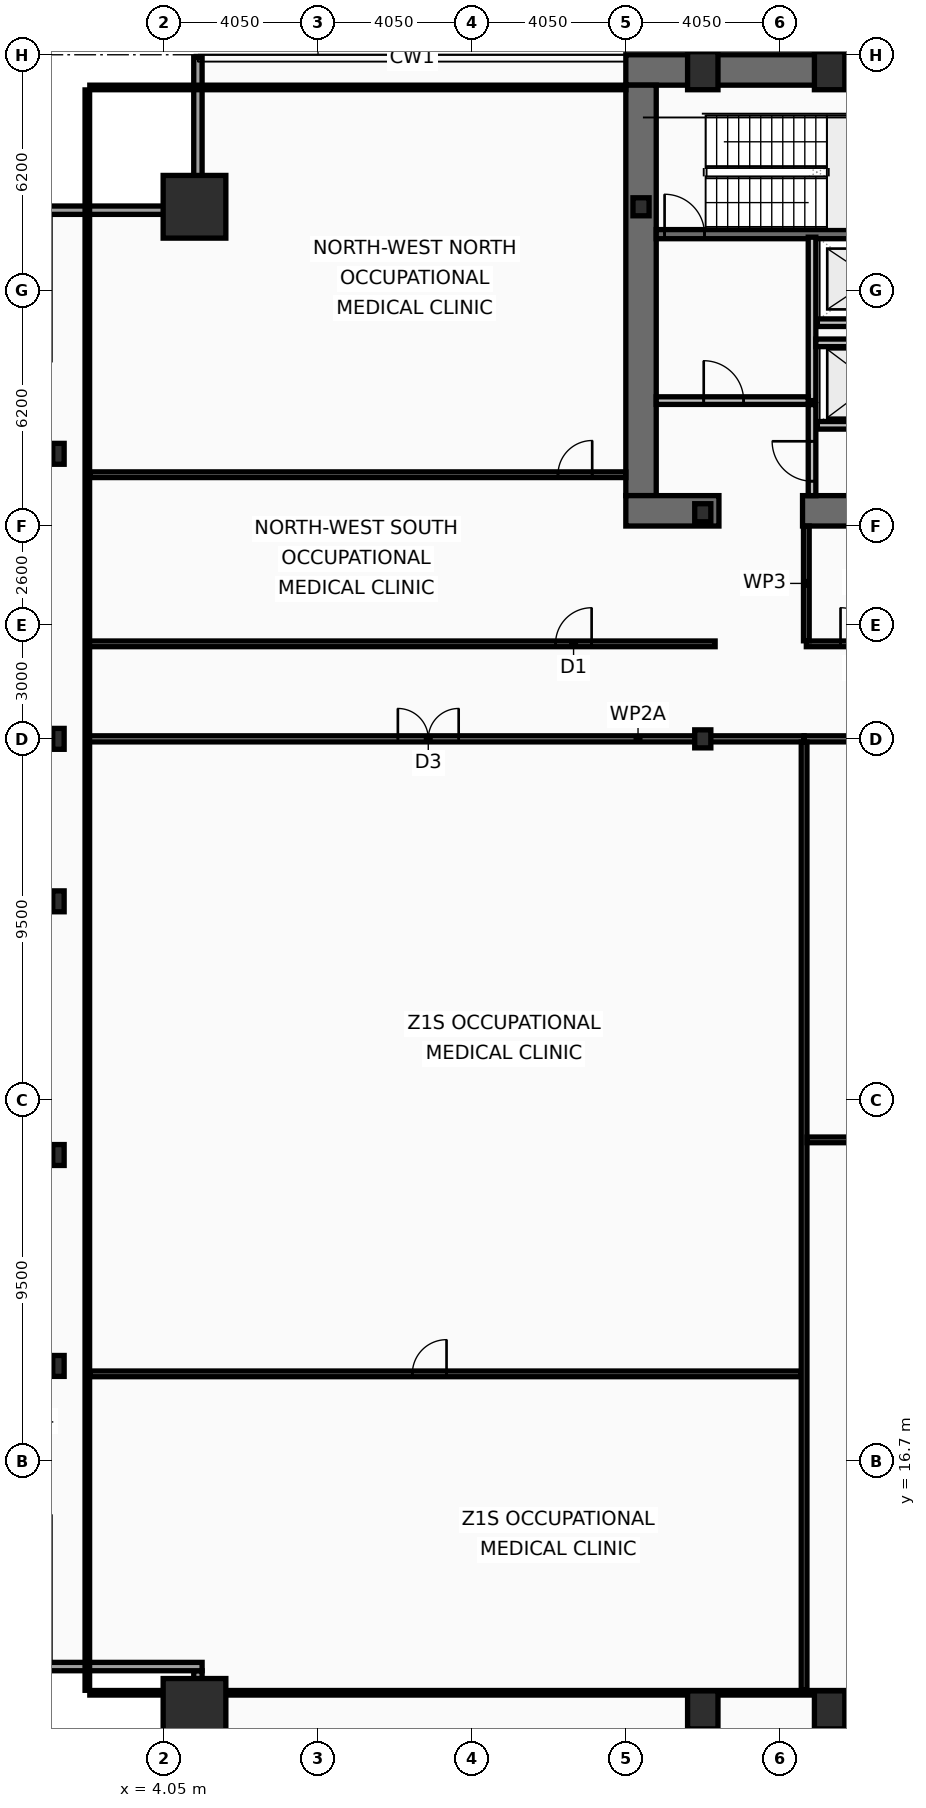
"""IFC4 building model, lengths in metres.
Left out: names, types, materials, properties, quantities, classifications, styles, units other than length and angle.
Written with IfcOpenShell. Run it as: python <this file> out.ifc"""

import sys

from ifc_helpers import new_model, si_unit, direction, frame, frame_2d, origin, origin_2d, place, context, subcontext, project, spatial, rectangle, hollow_rectangle, i_section, extrude, element, fill, save


model = new_model("IFC4")
c1 = context("Model", 3, precision=1e-05, world=origin(), true_north=direction((0.0, 1.0)))
c2 = subcontext(c1, "Body", "Model", "MODEL_VIEW")
j1 = project(units=[si_unit("LENGTHUNIT", "METRE"), si_unit("PLANEANGLEUNIT", "RADIAN")], contexts=[c1])
p1 = place(None, origin())
s1 = spatial("IfcSite", under=j1, at=p1, CompositionType="ELEMENT")
p2 = place(p1, origin())
s2 = spatial("IfcBuilding", under=s1, at=p2, CompositionType="ELEMENT")
p3 = place(p2, frame((0.0, 0.0, 37.8)))
s3 = spatial("IfcBuildingStorey", under=s2, at=p3, CompositionType="ELEMENT", Elevation=37.8)
p4 = place(p3, frame((16.2, 53.3, 0.0), z_axis=(0.0, 0.0, 1.0), x_axis=(1.0, 0.0, 0.0)))
e1 = element("IfcWall", 1, at=p4, inside=s3, PredefinedType="SHEAR", context=c2, shape_type="SweptSolid", body=[
    extrude(rectangle(XDim=40.5, YDim=0.8, at=frame_2d((20.25, 0.0))), origin(), (0.0, 0.0, 1.0), 3.82),
])
p5 = place(p3, frame((16.6, 42.1, 0.0), z_axis=(0.0, 0.0, 1.0), x_axis=(0.0, 1.0, 0.0)))
e2 = element("IfcWall", 2, at=p5, inside=s3, PredefinedType="SHEAR", context=c2, shape_type="SweptSolid", body=[
    extrude(rectangle(XDim=10.8, YDim=0.8, at=frame_2d((5.4, 0.0))), origin(), (0.0, 0.0, 1.0), 3.82),
])
p6 = place(p3, frame((18.65, 41.7, 0.0), z_axis=(0.0, 0.0, 1.0), x_axis=(-1.0, 0.0, 0.0)))
e3 = element("IfcWall", 3, at=p6, inside=s3, PredefinedType="SHEAR", context=c2, shape_type="SweptSolid", body=[
    extrude(rectangle(XDim=2.45, YDim=0.8, at=frame_2d((1.225, 0.0))), origin(), (0.0, 0.0, 1.0), 3.82),
])
p7 = place(p3, frame((32.3, 41.7, 0.0), z_axis=(0.0, 0.0, 1.0), x_axis=(-1.0, 0.0, 0.0)))
e4 = element("IfcWall", 4, at=p7, inside=s3, PredefinedType="SHEAR", context=c2, shape_type="SweptSolid", body=[
    extrude(rectangle(XDim=11.45, YDim=0.8, at=frame_2d((5.725, 0.0))), origin(), (0.0, 0.0, 1.0), 3.82),
])
p8 = place(p3, frame((17.0, 48.98, 0.0), z_axis=(0.0, 0.0, 1.0), x_axis=(1.0, 0.0, 0.0)))
e5 = element("IfcWall", 5, at=p8, inside=s3, PredefinedType="SHEAR", context=c2, shape_type="SweptSolid", body=[
    extrude(rectangle(XDim=7.22, YDim=0.24, at=frame_2d((3.61, 0.0))), origin(), (0.0, 0.0, 1.0), 3.82),
])
p9 = place(p8, frame((0.22, 0.0, 0.0)))
e6 = element("IfcOpeningElement", 6, at=p9, cuts=e5, PredefinedType="OPENING", context=c2, shape_type="SweptSolid", body=[
    extrude(rectangle(XDim=1.05, YDim=2.15, at=frame_2d((0.525, 1.075))), frame((0.0, 0.13, 0.0), z_axis=(0.0, -1.0, 0.0), x_axis=(1.0, 0.0, 0.0)), (0.0, 0.0, 1.0), 0.26),
])
for number, where, z_axis, x_axis in (
    (7, (4.85, 10.15, 0.0), (0.0, 0.0, 1.0), (1.0, 0.0, 0.0)),
    (8, (4.85, 49.7, 0.0), (0.0, 0.0, 1.0), (1.0, 0.0, 0.0)),
):
    element("IfcColumn", number, at=place(p3, frame(where, z_axis=z_axis, x_axis=x_axis)), inside=s3, PredefinedType="COLUMN", context=c2, shape_type="SweptSolid", body=[
        extrude(hollow_rectangle(XDim=1.65, YDim=1.65, WallThickness=0.075, at=origin_2d()), origin(), (0.0, 0.0, 1.0), 4.0),
    ])
for number, where, z_axis, x_axis in (
    (9, (18.225, 10.15, 0.0), (0.0, 0.0, 1.0), (1.0, 0.0, 0.0)),
    (10, (21.562, 10.15, 0.0), (0.0, 0.0, 1.0), (1.0, 0.0, 0.0)),
    (11, (18.225, 53.28, 0.0), (0.0, 0.0, 1.0), (1.0, 0.0, 0.0)),
    (12, (21.562, 53.28, 0.0), (0.0, 0.0, 1.0), (1.0, 0.0, 0.0)),
):
    element("IfcColumn", number, at=place(p3, frame(where, z_axis=z_axis, x_axis=x_axis)), inside=s3, PredefinedType="COLUMN", context=c2, shape_type="SweptSolid", body=[
        extrude(hollow_rectangle(XDim=0.8, YDim=1.0, WallThickness=0.055, at=origin_2d()), origin(), (0.0, 0.0, 1.0), 4.0),
    ])
for number, where, z_axis, x_axis in (
    (13, (1.27, 19.2, 0.0), (0.0, 0.0, 1.0), (1.0, 0.0, 0.0)),
    (14, (1.27, 24.75, 0.0), (0.0, 0.0, 1.0), (1.0, 0.0, 0.0)),
    (15, (1.27, 31.425, 0.0), (0.0, 0.0, 1.0), (1.0, 0.0, 0.0)),
    (16, (1.27, 35.7, 0.0), (0.0, 0.0, 1.0), (1.0, 0.0, 0.0)),
    (17, (1.27, 43.2, 0.0), (0.0, 0.0, 1.0), (1.0, 0.0, 0.0)),
):
    element("IfcColumn", number, at=place(p3, frame(where, z_axis=z_axis, x_axis=x_axis)), inside=s3, PredefinedType="COLUMN", context=c2, shape_type="SweptSolid", body=[
        extrude(i_section(OverallWidth=0.3, OverallDepth=0.55, WebThickness=0.015, FlangeThickness=0.029, at=origin_2d()), origin(), (0.0, 0.0, 1.0), 4.0),
    ])
for number, where, z_axis, x_axis in (
    (18, (16.6, 49.7, 0.0), (0.0, 0.0, 1.0), (1.0, 0.0, 0.0)),
    (19, (18.225, 35.7, 0.0), (0.0, 0.0, 1.0), (1.0, 0.0, 0.0)),
    (20, (18.225, 41.65, 0.0), (0.0, 0.0, 1.0), (1.0, 0.0, 0.0)),
):
    element("IfcColumn", number, at=place(p3, frame(where, z_axis=z_axis, x_axis=x_axis)), inside=s3, PredefinedType="COLUMN", context=c2, shape_type="SweptSolid", body=[
        extrude(i_section(OverallWidth=0.424, OverallDepth=0.474, WebThickness=0.048, FlangeThickness=0.077, at=origin_2d()), origin(), (0.0, 0.0, 1.0), 4.0),
    ])
p10 = place(p3, frame((4.94, 7.27, 0.0), z_axis=(0.0, 0.0, 1.0), x_axis=(0.0, 1.0, 0.0)))
e21 = element("IfcWall", 21, at=p10, inside=s3, PredefinedType="SOLIDWALL", context=c2, shape_type="SweptSolid", body=[
    extrude(rectangle(XDim=3.91, YDim=0.22, at=frame_2d((1.955, 0.0))), origin(), (0.0, 0.0, 1.0), 3.16),
])
for number, where, z_axis, x_axis in (
    (22, (5.05, 11.29, 0.0), (0.0, 0.0, 1.0), (-1.0, 0.0, 0.0)),
    (23, (0.83, 49.61, 0.0), (0.0, 0.0, 1.0), (1.0, 0.0, 0.0)),
):
    element("IfcWall", number, at=place(p3, frame(where, z_axis=z_axis, x_axis=x_axis)), inside=s3, PredefinedType="SOLIDWALL", context=c2, shape_type="SweptSolid", body=[
        extrude(rectangle(XDim=4.22, YDim=0.22, at=frame_2d((2.11, 0.0))), origin(), (0.0, 0.0, 1.0), 3.16),
    ])
p11 = place(p3, frame((4.94, 49.72, 0.0), z_axis=(0.0, 0.0, 1.0), x_axis=(0.0, 1.0, 0.0)))
e24 = element("IfcWall", 24, at=p11, inside=s3, PredefinedType="SOLIDWALL", context=c2, shape_type="SweptSolid", body=[
    extrude(rectangle(XDim=3.91, YDim=0.22, at=frame_2d((1.955, 0.0))), origin(), (0.0, 0.0, 1.0), 3.16),
])
p12 = place(p3, frame((24.21, 43.95, 0.0), z_axis=(0.0, 0.0, 1.0), x_axis=(-1.0, 0.0, 0.0)))
e25 = element("IfcWall", 25, at=p12, inside=s3, PredefinedType="PARTITIONING", context=c2, shape_type="SweptSolid", body=[
    extrude(rectangle(XDim=2.97, YDim=0.2, at=frame_2d((1.485, 0.0))), origin(), (0.0, 0.0, 1.0), 3.82),
])
p13 = place(p12, frame((0.86, 0.0, 0.0)))
e26 = element("IfcOpeningElement", 26, at=p13, cuts=e25, PredefinedType="OPENING", context=c2, shape_type="SweptSolid", body=[
    extrude(rectangle(XDim=1.3, YDim=2.18, at=frame_2d((0.65, 1.09))), frame((0.0, 0.11, 0.0), z_axis=(0.0, -1.0, 0.0), x_axis=(1.0, 0.0, 0.0)), (0.0, 0.0, 1.0), 0.22),
])
p14 = place(p3, frame((24.21, 46.65, 0.0), z_axis=(0.0, 0.0, 1.0), x_axis=(-1.0, 0.0, 0.0)))
e27 = element("IfcWall", 27, at=p14, inside=s3, PredefinedType="PARTITIONING", context=c2, shape_type="SweptSolid", body=[
    extrude(rectangle(XDim=2.97, YDim=0.2, at=frame_2d((1.485, 0.0))), origin(), (0.0, 0.0, 1.0), 3.82),
])
p15 = place(p14, frame((0.91, 0.0, 0.0)))
e28 = element("IfcOpeningElement", 28, at=p15, cuts=e27, PredefinedType="OPENING", context=c2, shape_type="SweptSolid", body=[
    extrude(rectangle(XDim=1.2, YDim=2.18, at=frame_2d((0.6, 1.09))), frame((0.0, 0.11, 0.0), z_axis=(0.0, -1.0, 0.0), x_axis=(1.0, 0.0, 0.0)), (0.0, 0.0, 1.0), 0.22),
])
p16 = place(p3, frame((21.1, 44.6, 0.0), z_axis=(0.0, 0.0, 1.0), x_axis=(0.0, 1.0, 0.0)))
e29 = element("IfcWall", 29, at=p16, inside=s3, PredefinedType="PARTITIONING", context=c2, shape_type="SweptSolid", body=[
    extrude(rectangle(XDim=4.3, YDim=0.2, at=frame_2d((2.15, 0.0))), origin(), (0.0, 0.0, 1.0), 3.82),
])
p17 = place(p3, frame((17.0, 44.6, 0.0), z_axis=(0.0, 0.0, 1.0), x_axis=(1.0, 0.0, 0.0)))
e30 = element("IfcWall", 30, at=p17, inside=s3, PredefinedType="PARTITIONING", context=c2, shape_type="SweptSolid", body=[
    extrude(rectangle(XDim=4.0, YDim=0.2, at=frame_2d((2.0, 0.0))), origin(), (0.0, 0.0, 1.0), 3.82),
])
p18 = place(p17, frame((1.25, 0.0, 0.0)))
e31 = element("IfcOpeningElement", 31, at=p18, cuts=e30, PredefinedType="OPENING", context=c2, shape_type="SweptSolid", body=[
    extrude(rectangle(XDim=1.05, YDim=2.15, at=frame_2d((0.525, 1.075))), frame((0.0, 0.11, 0.0), z_axis=(0.0, -1.0, 0.0), x_axis=(1.0, 0.0, 0.0)), (0.0, 0.0, 1.0), 0.22),
])
p19 = place(p3, frame((21.2, 46.12, 0.0), z_axis=(0.0, 0.0, 1.0), x_axis=(1.0, 0.0, 0.0)))
e32 = element("IfcWall", 32, at=p19, inside=s3, PredefinedType="PARTITIONING", context=c2, shape_type="SweptSolid", body=[
    extrude(rectangle(XDim=3.02, YDim=0.2, at=frame_2d((1.51, 0.0))), origin(), (0.0, 0.0, 1.0), 3.82),
])
p20 = place(p3, frame((21.1, 42.1, 0.0), z_axis=(0.0, 0.0, 1.0), x_axis=(0.0, 1.0, 0.0)))
e33 = element("IfcWall", 33, at=p20, inside=s3, PredefinedType="PARTITIONING", context=c2, shape_type="SweptSolid", body=[
    extrude(rectangle(XDim=2.395, YDim=0.2, at=frame_2d((1.198, 0.0))), origin(), (0.0, 0.0, 1.0), 3.82),
])
p21 = place(p20, frame((0.38, 0.0, 0.0)))
e34 = element("IfcOpeningElement", 34, at=p21, cuts=e33, PredefinedType="OPENING", context=c2, shape_type="SweptSolid", body=[
    extrude(rectangle(XDim=1.05, YDim=2.15, at=frame_2d((0.525, 1.075))), frame((0.0, 0.11, 0.0), z_axis=(0.0, -1.0, 0.0), x_axis=(1.0, 0.0, 0.0)), (0.0, 0.0, 1.0), 0.22),
])
p22 = place(p3, frame((20.95, 38.2, 0.0), z_axis=(0.0, 0.0, 1.0), x_axis=(1.0, 0.0, 0.0)))
e35 = element("IfcWall", 35, at=p22, inside=s3, PredefinedType="PARTITIONING", context=c2, shape_type="SweptSolid", body=[
    extrude(rectangle(XDim=3.75, YDim=0.15, at=frame_2d((1.875, 0.0))), origin(), (0.0, 0.0, 1.0), 3.01),
])
p23 = place(p22, frame((0.9, 0.0, 0.0)))
e36 = element("IfcOpeningElement", 36, at=p23, cuts=e35, PredefinedType="OPENING", context=c2, shape_type="SweptSolid", body=[
    extrude(rectangle(XDim=0.95, YDim=2.05, at=frame_2d((0.475, 1.025))), frame((0.0, 0.085, 0.0), z_axis=(0.0, -1.0, 0.0), x_axis=(1.0, 0.0, 0.0)), (0.0, 0.0, 1.0), 0.17),
])
p24 = place(p3, frame((20.95, 38.28, 0.0), z_axis=(0.0, 0.0, 1.0), x_axis=(0.0, 1.0, 0.0)))
e37 = element("IfcWall", 37, at=p24, inside=s3, PredefinedType="PARTITIONING", context=c2, shape_type="SweptSolid", body=[
    extrude(rectangle(XDim=3.02, YDim=0.15, at=frame_2d((1.51, 0.0))), origin(), (0.0, 0.0, 1.0), 3.82),
])
p25 = place(p3, frame((2.03, 38.2, 0.0), z_axis=(0.0, 0.0, 1.0), x_axis=(1.0, 0.0, 0.0)))
e38 = element("IfcWall", 38, at=p25, inside=s3, PredefinedType="PARTITIONING", context=c2, shape_type="SweptSolid", body=[
    extrude(rectangle(XDim=16.52, YDim=0.15, at=frame_2d((8.26, 0.0))), origin(), (0.0, 0.0, 1.0), 3.01),
])
p26 = place(p25, frame((12.32, 0.0, 0.0)))
e39 = element("IfcOpeningElement", 39, at=p26, cuts=e38, PredefinedType="OPENING", context=c2, shape_type="SweptSolid", body=[
    extrude(rectangle(XDim=0.95, YDim=2.05, at=frame_2d((0.475, 1.025))), frame((0.0, 0.085, 0.0), z_axis=(0.0, -1.0, 0.0), x_axis=(1.0, 0.0, 0.0)), (0.0, 0.0, 1.0), 0.17),
])
p27 = place(p3, frame((2.095, 42.65, 0.0), z_axis=(0.0, 0.0, 1.0), x_axis=(1.0, 0.0, 0.0)))
e40 = element("IfcWall", 40, at=p27, inside=s3, PredefinedType="PARTITIONING", context=c2, shape_type="SweptSolid", body=[
    extrude(rectangle(XDim=14.105, YDim=0.15, at=frame_2d((7.052, 0.0))), origin(), (0.0, 0.0, 1.0), 3.01),
])
p28 = place(p27, frame((12.32, 0.0, 0.0)))
e41 = element("IfcOpeningElement", 41, at=p28, cuts=e40, PredefinedType="OPENING", context=c2, shape_type="SweptSolid", body=[
    extrude(rectangle(XDim=0.9, YDim=2.05, at=frame_2d((0.45, 1.025))), frame((0.0, 0.085, 0.0), z_axis=(0.0, -1.0, 0.0), x_axis=(1.0, 0.0, 0.0)), (0.0, 0.0, 1.0), 0.17),
])
p29 = place(p3, frame((2.03, 35.7, 0.0), z_axis=(0.0, 0.0, 1.0), x_axis=(1.0, 0.0, 0.0)))
e42 = element("IfcWall", 42, at=p29, inside=s3, PredefinedType="PARTITIONING", context=c2, shape_type="SweptSolid", body=[
    extrude(rectangle(XDim=18.861, YDim=0.16, at=frame_2d((9.431, 0.0))), origin(), (0.0, 0.0, 1.0), 3.01),
])
p30 = place(p29, frame((8.172, 0.0, 0.0)))
e43 = element("IfcOpeningElement", 43, at=p30, cuts=e42, PredefinedType="OPENING", context=c2, shape_type="SweptSolid", body=[
    extrude(rectangle(XDim=1.6, YDim=2.15, at=frame_2d((0.8, 1.075))), frame((0.0, 0.09, 0.0), z_axis=(0.0, -1.0, 0.0), x_axis=(1.0, 0.0, 0.0)), (0.0, 0.0, 1.0), 0.18),
])
p31 = place(p3, frame((2.095, 18.991, 0.0), z_axis=(0.0, 0.0, 1.0), x_axis=(1.0, 0.0, 0.0)))
e44 = element("IfcWall", 44, at=p31, inside=s3, PredefinedType="PARTITIONING", context=c2, shape_type="SweptSolid", body=[
    extrude(rectangle(XDim=18.716, YDim=0.15, at=frame_2d((9.358, 0.0))), origin(), (0.0, 0.0, 1.0), 3.01),
])
p32 = place(p31, frame((8.487, 0.0, 0.0)))
e45 = element("IfcOpeningElement", 45, at=p32, cuts=e44, PredefinedType="OPENING", context=c2, shape_type="SweptSolid", body=[
    extrude(rectangle(XDim=0.9, YDim=2.05, at=frame_2d((0.45, 1.025))), frame((0.0, 0.085, 0.0), z_axis=(0.0, -1.0, 0.0), x_axis=(1.0, 0.0, 0.0)), (0.0, 0.0, 1.0), 0.17),
])
p33 = place(p3, frame((20.891, 35.7, 0.0), z_axis=(0.0, 0.0, 1.0), x_axis=(1.0, 0.0, 0.0)))
e46 = element("IfcWall", 46, at=p33, inside=s3, PredefinedType="PARTITIONING", context=c2, shape_type="SweptSolid", body=[
    extrude(rectangle(XDim=15.0, YDim=0.16, at=frame_2d((7.5, 0.0))), origin(), (0.0, 0.0, 1.0), 3.01),
])
p34 = place(p33, frame((6.55, 0.0, 0.0)))
e47 = element("IfcOpeningElement", 47, at=p34, cuts=e46, PredefinedType="OPENING", context=c2, shape_type="SweptSolid", body=[
    extrude(rectangle(XDim=1.6, YDim=2.15, at=frame_2d((0.8, 1.075))), frame((0.0, 0.09, 0.0), z_axis=(0.0, -1.0, 0.0), x_axis=(1.0, 0.0, 0.0)), (0.0, 0.0, 1.0), 0.18),
])
p35 = place(p3, frame((20.891, 10.665, 0.0), z_axis=(0.0, 0.0, 1.0), x_axis=(0.0, 1.0, 0.0)))
e48 = element("IfcWall", 48, at=p35, inside=s3, PredefinedType="PARTITIONING", context=c2, shape_type="SweptSolid", body=[
    extrude(rectangle(XDim=24.95, YDim=0.15, at=frame_2d((12.475, 0.0))), origin(), (0.0, 0.0, 1.0), 3.21),
])
p36 = place(p3, frame((20.971, 25.148, 0.0), z_axis=(0.0, 0.0, 1.0), x_axis=(1.0, 0.0, 0.0)))
e49 = element("IfcWall", 49, at=p36, inside=s3, PredefinedType="PARTITIONING", context=c2, shape_type="SweptSolid", body=[
    extrude(rectangle(XDim=14.841, YDim=0.15, at=frame_2d((7.42, 0.0))), origin(), (0.0, 0.0, 1.0), 3.01),
])
p37 = place(p36, frame((6.75, 0.0, 0.0)))
e50 = element("IfcOpeningElement", 50, at=p37, cuts=e49, PredefinedType="OPENING", context=c2, shape_type="SweptSolid", body=[
    extrude(rectangle(XDim=0.9, YDim=2.05, at=frame_2d((0.45, 1.025))), frame((0.0, 0.085, 0.0), z_axis=(0.0, -1.0, 0.0), x_axis=(1.0, 0.0, 0.0)), (0.0, 0.0, 1.0), 0.17),
])
p38 = place(p3, frame((2.03, 10.665, 0.0), z_axis=(0.0, 0.0, 1.0), x_axis=(0.0, 1.0, 0.0)))
e51 = element("IfcWall", 51, at=p38, inside=s3, PredefinedType="PARTITIONING", context=c2, shape_type="SweptSolid", body=[
    extrude(rectangle(XDim=42.11, YDim=0.12, at=frame_2d((21.055, 0.0))), origin(), (0.0, 0.0, 1.0), 3.01),
])
p39 = place(p3, frame((2.095, 52.84, 0.0), z_axis=(0.0, 0.0, 1.0), x_axis=(1.0, 0.0, 0.0)))
e52 = element("IfcWall", 52, at=p39, inside=s3, PredefinedType="PARTITIONING", context=c2, shape_type="SweptSolid", body=[
    extrude(rectangle(XDim=14.105, YDim=0.12, at=frame_2d((7.052, 0.0))), origin(), (0.0, 0.0, 1.0), 3.82),
])
p40 = place(p3, frame((2.095, 10.6, 0.0), z_axis=(0.0, 0.0, 1.0), x_axis=(1.0, 0.0, 0.0)))
e53 = element("IfcWall", 53, at=p40, inside=s3, PredefinedType="PARTITIONING", context=c2, shape_type="SweptSolid", body=[
    extrude(rectangle(XDim=68.71, YDim=0.12, at=frame_2d((34.355, 0.0))), origin(), (0.0, 0.0, 1.0), 3.01),
])
p41 = place(p9, origin())
e54 = element("IfcDoor", 54, at=p41, inside=s3, OperationType="SINGLE_SWING_LEFT", PredefinedType="DOOR", context=c2, shape_type="SweptSolid", body=[
    extrude(rectangle(XDim=1.05, YDim=2.15, at=frame_2d((0.525, 1.075))), frame((0.0, 0.025, 0.0), z_axis=(0.0, -1.0, 0.0), x_axis=(1.0, 0.0, 0.0)), (0.0, 0.0, 1.0), 0.05),
])
fill(e6, e54)
p42 = place(p18, origin())
e55 = element("IfcDoor", 55, at=p42, inside=s3, OperationType="SINGLE_SWING_LEFT", PredefinedType="DOOR", context=c2, shape_type="SweptSolid", body=[
    extrude(rectangle(XDim=1.05, YDim=2.15, at=frame_2d((0.525, 1.075))), frame((0.0, 0.025, 0.0), z_axis=(0.0, -1.0, 0.0), x_axis=(1.0, 0.0, 0.0)), (0.0, 0.0, 1.0), 0.05),
])
fill(e31, e55)
p43 = place(p21, origin())
e56 = element("IfcDoor", 56, at=p43, inside=s3, OperationType="SINGLE_SWING_RIGHT", PredefinedType="DOOR", context=c2, shape_type="SweptSolid", body=[
    extrude(rectangle(XDim=1.05, YDim=2.15, at=frame_2d((0.525, 1.075))), frame((0.0, 0.025, 0.0), z_axis=(0.0, -1.0, 0.0), x_axis=(1.0, 0.0, 0.0)), (0.0, 0.0, 1.0), 0.05),
])
fill(e34, e56)
p44 = place(p23, origin())
e57 = element("IfcDoor", 57, at=p44, inside=s3, OperationType="SINGLE_SWING_LEFT", PredefinedType="DOOR", context=c2, shape_type="SweptSolid", body=[
    extrude(rectangle(XDim=0.95, YDim=2.05, at=frame_2d((0.475, 1.025))), frame((0.0, 0.025, 0.0), z_axis=(0.0, -1.0, 0.0), x_axis=(1.0, 0.0, 0.0)), (0.0, 0.0, 1.0), 0.05),
])
fill(e36, e57)
p45 = place(p26, origin())
e58 = element("IfcDoor", 58, at=p45, inside=s3, OperationType="SINGLE_SWING_RIGHT", PredefinedType="DOOR", context=c2, shape_type="SweptSolid", body=[
    extrude(rectangle(XDim=0.95, YDim=2.05, at=frame_2d((0.475, 1.025))), frame((0.0, 0.025, 0.0), z_axis=(0.0, -1.0, 0.0), x_axis=(1.0, 0.0, 0.0)), (0.0, 0.0, 1.0), 0.05),
])
fill(e39, e58)
p46 = place(p28, origin())
e59 = element("IfcDoor", 59, at=p46, inside=s3, OperationType="SINGLE_SWING_RIGHT", PredefinedType="DOOR", context=c2, shape_type="SweptSolid", body=[
    extrude(rectangle(XDim=0.9, YDim=2.05, at=frame_2d((0.45, 1.025))), frame((0.0, 0.025, 0.0), z_axis=(0.0, -1.0, 0.0), x_axis=(1.0, 0.0, 0.0)), (0.0, 0.0, 1.0), 0.05),
])
fill(e41, e59)
p47 = place(p30, origin())
e60 = element("IfcDoor", 60, at=p47, inside=s3, OperationType="DOUBLE_DOOR_SINGLE_SWING", PredefinedType="DOOR", context=c2, shape_type="SweptSolid", body=[
    extrude(rectangle(XDim=1.6, YDim=2.15, at=frame_2d((0.8, 1.075))), frame((0.0, 0.025, 0.0), z_axis=(0.0, -1.0, 0.0), x_axis=(1.0, 0.0, 0.0)), (0.0, 0.0, 1.0), 0.05),
])
fill(e43, e60)
p48 = place(p32, origin())
e61 = element("IfcDoor", 61, at=p48, inside=s3, OperationType="SINGLE_SWING_RIGHT", PredefinedType="DOOR", context=c2, shape_type="SweptSolid", body=[
    extrude(rectangle(XDim=0.9, YDim=2.05, at=frame_2d((0.45, 1.025))), frame((0.0, 0.025, 0.0), z_axis=(0.0, -1.0, 0.0), x_axis=(1.0, 0.0, 0.0)), (0.0, 0.0, 1.0), 0.05),
])
fill(e45, e61)
save(model, sys.argv[1])
